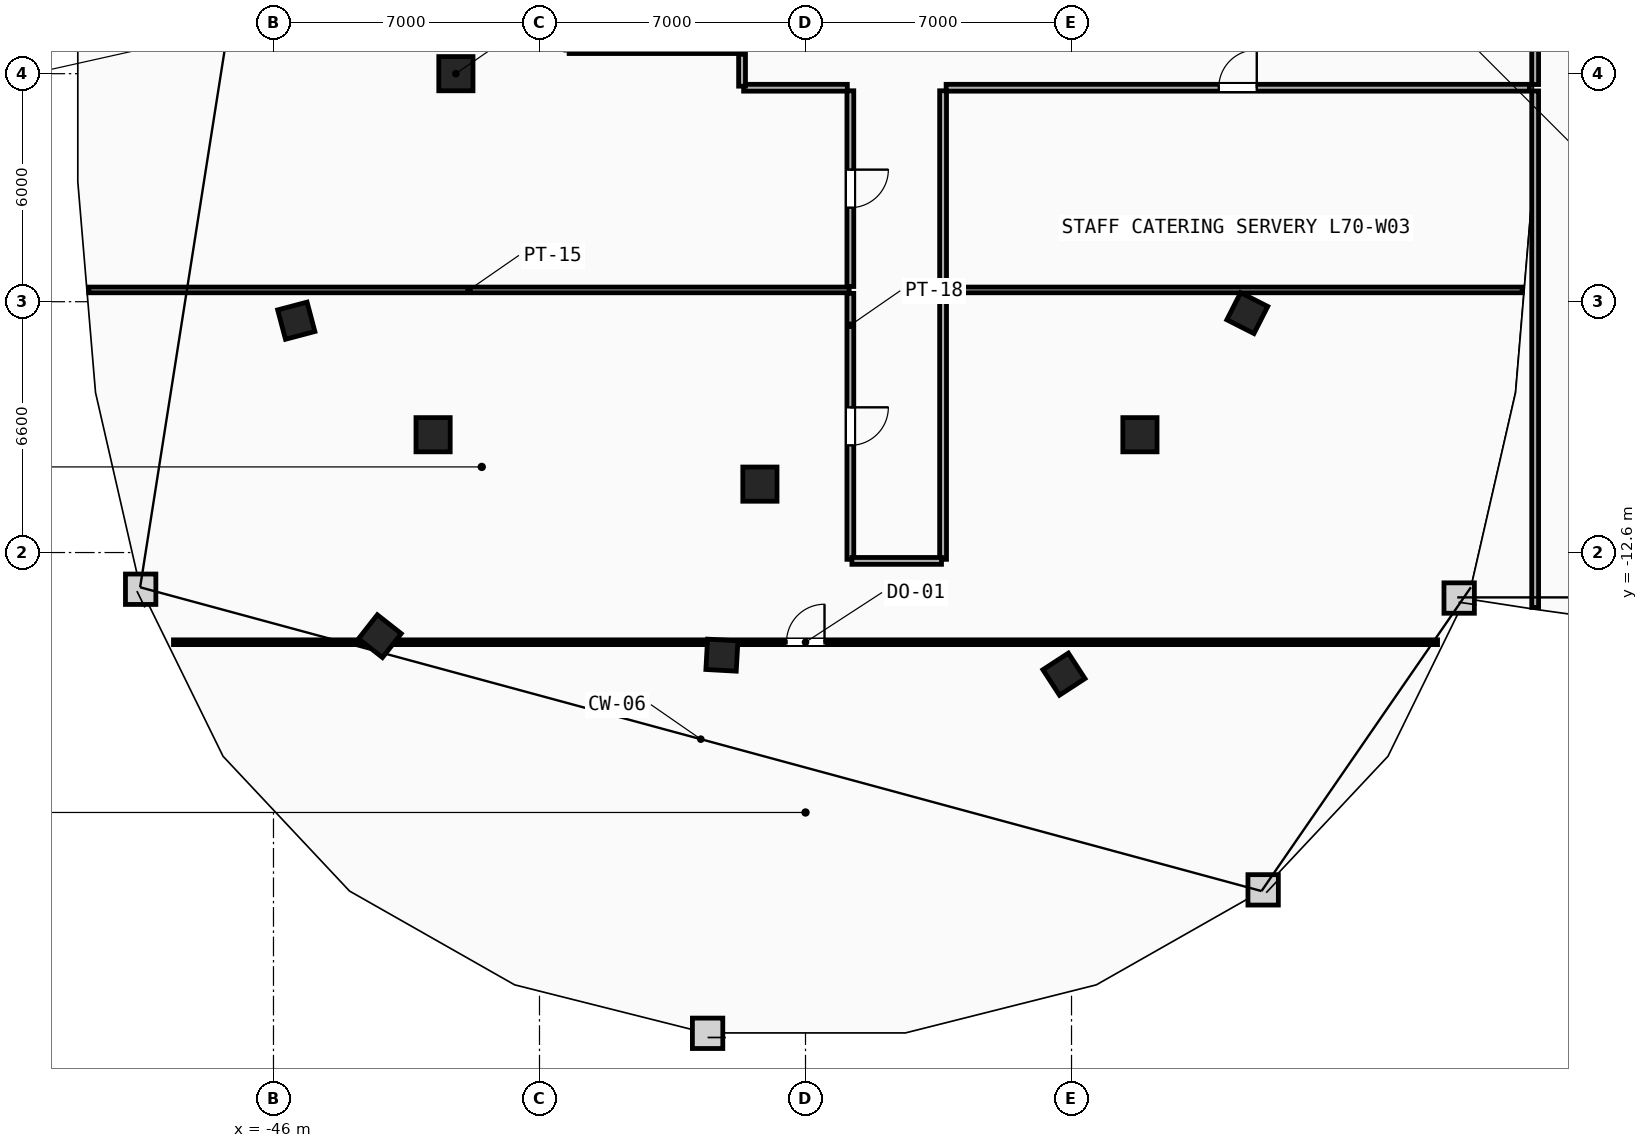
"""IFC4 building model, lengths in metres.
Left out: names, types, materials, properties, quantities, classifications, styles, units other than length and angle.
Written with IfcOpenShell. Run it as: python <this file> out.ifc"""

import sys

from ifc_helpers import new_model, si_unit, direction, frame, frame_2d, origin, origin_2d, place, context, subcontext, project, spatial, rectangle, extrude, element, fill, save


model = new_model("IFC4")
c1 = context("Model", 3, precision=1e-05, world=origin(), true_north=direction((0.0, 1.0)))
c2 = subcontext(c1, "Body", "Model", "MODEL_VIEW")
j1 = project(units=[si_unit("LENGTHUNIT", "METRE"), si_unit("PLANEANGLEUNIT", "RADIAN")], contexts=[c1])
p1 = place(None, origin())
s1 = spatial("IfcSite", under=j1, at=p1, CompositionType="ELEMENT")
p2 = place(p1, origin())
s2 = spatial("IfcBuilding", under=s1, at=p2, CompositionType="ELEMENT")
p3 = place(p2, frame((0.0, 0.0, 264.8)))
s3 = spatial("IfcBuildingStorey", under=s2, at=p3, CompositionType="ELEMENT", Elevation=264.8)
for number, where, z_axis, x_axis in (
    (1, (-41.2, 0.0, 0.0), (0.0, 0.0, 1.0), (1.0, 0.0, 0.0)),
    (2, (-41.8, -9.5, 0.0), (0.0, 0.0, 1.0), (1.0, 0.0, 0.0)),
    (3, (-33.2, -10.8, 0.0), (0.0, 0.0, 1.0), (1.0, 0.0, 0.0)),
    (4, (-23.2, -9.5, 0.0), (0.0, 0.0, 1.0), (1.0, 0.0, 0.0)),
):
    element("IfcColumn", number, at=place(p3, frame(where, z_axis=z_axis, x_axis=x_axis)), inside=s3, PredefinedType="COLUMN", context=c2, shape_type="SweptSolid", body=[
        extrude(rectangle(XDim=0.9, YDim=0.9, at=origin_2d()), origin(), (0.0, 0.0, 1.0), 3.6),
    ])
for number, where, z_axis, x_axis in (
    (5, (-45.4, -6.5, 0.0), (0.0, 0.0, 1.0), (0.256, -0.967, 0.0)),
    (6, (-43.2, -14.8, 0.0), (0.0, 0.0, 1.0), (0.786, -0.618, 0.0)),
    (7, (-34.2, -15.3, 0.0), (0.0, 0.0, 1.0), (0.998, -0.055, 0.0)),
    (8, (-25.2, -15.8, 0.0), (0.0, 0.0, 1.0), (0.838, 0.546, 0.0)),
    (9, (-20.375, -6.3, 0.0), (0.0, 0.0, 1.0), (0.453, 0.892, 0.0)),
):
    element("IfcColumn", number, at=place(p3, frame(where, z_axis=z_axis, x_axis=x_axis)), inside=s3, PredefinedType="COLUMN", context=c2, shape_type="SweptSolid", body=[
        extrude(rectangle(XDim=0.8, YDim=0.8, at=origin_2d()), origin(), (0.0, 0.0, 1.0), 3.6),
    ])
p4 = place(p3, frame((-38.22, 0.6, 0.0), z_axis=(0.0, 0.0, 1.0), x_axis=(1.0, 0.0, 0.0)))
e10 = element("IfcWall", 10, at=p4, inside=s3, PredefinedType="PARTITIONING", context=c2, shape_type="SweptSolid", body=[
    extrude(rectangle(XDim=4.48, YDim=0.14, at=frame_2d((2.24, 0.0))), origin(), (0.0, 0.0, 1.0), 3.34),
])
p5 = place(p3, frame((-50.86, -5.69, 0.0), z_axis=(0.0, 0.0, 1.0), x_axis=(1.0, 0.0, 0.0)))
e11 = element("IfcWall", 11, at=p5, inside=s3, PredefinedType="PARTITIONING", context=c2, shape_type="SweptSolid", body=[
    extrude(rectangle(XDim=20.01, YDim=0.15, at=frame_2d((10.005, 0.0))), origin(), (0.0, 0.0, 1.0), 3.34),
])
p6 = place(p3, frame((-28.35, -5.69, 0.0), z_axis=(0.0, 0.0, 1.0), x_axis=(1.0, 0.0, 0.0)))
e12 = element("IfcWall", 12, at=p6, inside=s3, PredefinedType="PARTITIONING", context=c2, shape_type="SweptSolid", body=[
    extrude(rectangle(XDim=15.21, YDim=0.15, at=frame_2d((7.605, 0.0))), origin(), (0.0, 0.0, 1.0), 3.34),
])
p7 = place(p3, frame((-30.82, -5.78, 0.0), z_axis=(0.0, 0.0, 1.0), x_axis=(0.0, -1.0, 0.0)))
e13 = element("IfcWall", 13, at=p7, inside=s3, PredefinedType="PARTITIONING", context=c2, shape_type="SweptSolid", body=[
    extrude(rectangle(XDim=6.999, YDim=0.18, at=frame_2d((3.499, 0.0))), origin(), (0.0, 0.0, 1.0), 3.34),
])
p8 = place(p7, frame((2.999, 0.0, 0.0)))
e14 = element("IfcOpeningElement", 14, at=p8, cuts=e13, PredefinedType="OPENING", context=c2, shape_type="SweptSolid", body=[
    extrude(rectangle(XDim=1.0, YDim=2.15, at=frame_2d((0.5, 1.075))), frame((0.0, 0.1, 0.0), z_axis=(0.0, -1.0, 0.0), x_axis=(1.0, 0.0, 0.0)), (0.0, 0.0, 1.0), 0.2),
])
p9 = place(p3, frame((-28.38, -12.779, 0.0), z_axis=(0.0, 0.0, 1.0), x_axis=(0.0, 1.0, 0.0)))
e15 = element("IfcWall", 15, at=p9, inside=s3, PredefinedType="PARTITIONING", context=c2, shape_type="SweptSolid", body=[
    extrude(rectangle(XDim=6.999, YDim=0.18, at=frame_2d((3.499, 0.0))), origin(), (0.0, 0.0, 1.0), 3.34),
])
p10 = place(p3, frame((-30.779, -12.82, 0.0), z_axis=(0.0, 0.0, 1.0), x_axis=(1.0, 0.0, 0.0)))
e16 = element("IfcWall", 16, at=p10, inside=s3, PredefinedType="PARTITIONING", context=c2, shape_type="SweptSolid", body=[
    extrude(rectangle(XDim=2.357, YDim=0.18, at=frame_2d((1.179, 0.0))), origin(), (0.0, 0.0, 1.0), 3.34),
])
p11 = place(p3, frame((-28.3, -0.37, 0.0), z_axis=(0.0, 0.0, 1.0), x_axis=(1.0, 0.0, 0.0)))
e17 = element("IfcWall", 17, at=p11, inside=s3, PredefinedType="PARTITIONING", context=c2, shape_type="SweptSolid", body=[
    extrude(rectangle(XDim=15.349, YDim=0.18, at=frame_2d((7.675, 0.0))), origin(), (0.0, 0.0, 1.0), 3.34),
])
p12 = place(p11, frame((7.175, 0.0, 0.0)))
e18 = element("IfcOpeningElement", 18, at=p12, cuts=e17, PredefinedType="OPENING", context=c2, shape_type="SweptSolid", body=[
    extrude(rectangle(XDim=1.0, YDim=2.15, at=frame_2d((0.5, 1.075))), frame((0.0, 0.1, 0.0), z_axis=(0.0, -1.0, 0.0), x_axis=(1.0, 0.0, 0.0)), (0.0, 0.0, 1.0), 0.2),
])
p13 = place(p3, frame((-28.38, -5.6, 0.0), z_axis=(0.0, 0.0, 1.0), x_axis=(0.0, 1.0, 0.0)))
e19 = element("IfcWall", 19, at=p13, inside=s3, PredefinedType="PARTITIONING", context=c2, shape_type="SweptSolid", body=[
    extrude(rectangle(XDim=5.15, YDim=0.18, at=frame_2d((2.575, 0.0))), origin(), (0.0, 0.0, 1.0), 3.34),
])
p14 = place(p3, frame((-30.82, -0.45, 0.0), z_axis=(0.0, 0.0, 1.0), x_axis=(0.0, -1.0, 0.0)))
e20 = element("IfcWall", 20, at=p14, inside=s3, PredefinedType="PARTITIONING", context=c2, shape_type="SweptSolid", body=[
    extrude(rectangle(XDim=5.15, YDim=0.18, at=frame_2d((2.575, 0.0))), origin(), (0.0, 0.0, 1.0), 3.34),
])
p15 = place(p14, frame((2.075, 0.0, 0.0)))
e21 = element("IfcOpeningElement", 21, at=p15, cuts=e20, PredefinedType="OPENING", context=c2, shape_type="SweptSolid", body=[
    extrude(rectangle(XDim=1.0, YDim=2.15, at=frame_2d((0.5, 1.075))), frame((0.0, 0.1, 0.0), z_axis=(0.0, -1.0, 0.0), x_axis=(1.0, 0.0, 0.0)), (0.0, 0.0, 1.0), 0.2),
])
p16 = place(p3, frame((-33.628, -0.37, 0.0), z_axis=(0.0, 0.0, 1.0), x_axis=(1.0, 0.0, 0.0)))
e22 = element("IfcWall", 22, at=p16, inside=s3, PredefinedType="PARTITIONING", context=c2, shape_type="SweptSolid", body=[
    extrude(rectangle(XDim=2.729, YDim=0.18, at=frame_2d((1.364, 0.0))), origin(), (0.0, 0.0, 1.0), 3.34),
])
p17 = place(p3, frame((-33.67, 0.509, 0.0), z_axis=(0.0, 0.0, 1.0), x_axis=(0.0, -1.0, 0.0)))
e23 = element("IfcWall", 23, at=p17, inside=s3, PredefinedType="PARTITIONING", context=c2, shape_type="SweptSolid", body=[
    extrude(rectangle(XDim=0.837, YDim=0.18, at=frame_2d((0.418, 0.0))), origin(), (0.0, 0.0, 1.0), 3.34),
])
p18 = place(p3, frame((-48.632, -14.96, 0.0), z_axis=(0.0, 0.0, 1.0), x_axis=(1.0, 0.0, 0.0)))
e24 = element("IfcWall", 24, at=p18, inside=s3, PredefinedType="PARTITIONING", context=c2, shape_type="SweptSolid", body=[
    extrude(rectangle(XDim=33.263, YDim=0.125, at=frame_2d((16.632, 0.0))), origin(), (0.0, 0.0, 1.0), 2.724),
])
p19 = place(p18, frame((16.132, 0.0, 0.0)))
e25 = element("IfcOpeningElement", 25, at=p19, cuts=e24, PredefinedType="OPENING", context=c2, shape_type="SweptSolid", body=[
    extrude(rectangle(XDim=1.0, YDim=2.15, at=frame_2d((0.5, 1.075))), frame((0.0, 0.073, 0.0), z_axis=(0.0, -1.0, 0.0), x_axis=(1.0, 0.0, 0.0)), (0.0, 0.0, 1.0), 0.145),
])
p20 = place(p3, frame((-12.8, -14.044, 0.0), z_axis=(0.0, 0.0, 1.0), x_axis=(0.0, 1.0, 0.0)))
e26 = element("IfcWall", 26, at=p20, inside=s3, PredefinedType="PARTITIONING", context=c2, shape_type="SweptSolid", body=[
    extrude(rectangle(XDim=13.589, YDim=0.18, at=frame_2d((6.794, 0.0))), origin(), (0.0, 0.0, 1.0), 3.34),
])
p21 = place(p3, frame((-12.8, -0.285, 0.0), z_axis=(0.0, 0.0, 1.0), x_axis=(0.0, 1.0, 0.0)))
e27 = element("IfcWall", 27, at=p21, inside=s3, PredefinedType="PARTITIONING", context=c2, shape_type="SweptSolid", body=[
    extrude(rectangle(XDim=1.445, YDim=0.18, at=frame_2d((0.722, 0.0))), origin(), (0.0, 0.0, 1.0), 3.34),
])
p22 = place(p19, origin())
e28 = element("IfcDoor", 28, at=p22, inside=s3, OperationType="SINGLE_SWING_RIGHT", PredefinedType="DOOR", context=c2, shape_type="SweptSolid", body=[
    extrude(rectangle(XDim=1.0, YDim=2.15, at=frame_2d((0.5, 1.075))), frame((0.0, 0.025, 0.0), z_axis=(0.0, -1.0, 0.0), x_axis=(1.0, 0.0, 0.0)), (0.0, 0.0, 1.0), 0.05),
])
fill(e25, e28)
p23 = place(p12, origin())
e29 = element("IfcDoor", 29, at=p23, inside=s3, OperationType="SINGLE_SWING_RIGHT", PredefinedType="DOOR", context=c2, shape_type="SweptSolid", body=[
    extrude(rectangle(XDim=1.0, YDim=2.15, at=frame_2d((0.5, 1.075))), frame((0.0, 0.025, 0.0), z_axis=(0.0, -1.0, 0.0), x_axis=(1.0, 0.0, 0.0)), (0.0, 0.0, 1.0), 0.05),
])
fill(e18, e29)
p24 = place(p8, origin())
e30 = element("IfcDoor", 30, at=p24, inside=s3, OperationType="SINGLE_SWING_LEFT", PredefinedType="DOOR", context=c2, shape_type="SweptSolid", body=[
    extrude(rectangle(XDim=1.0, YDim=2.15, at=frame_2d((0.5, 1.075))), frame((0.0, 0.025, 0.0), z_axis=(0.0, -1.0, 0.0), x_axis=(1.0, 0.0, 0.0)), (0.0, 0.0, 1.0), 0.05),
])
fill(e14, e30)
p25 = place(p15, origin())
e31 = element("IfcDoor", 31, at=p25, inside=s3, OperationType="SINGLE_SWING_LEFT", PredefinedType="DOOR", context=c2, shape_type="SweptSolid", body=[
    extrude(rectangle(XDim=1.0, YDim=2.15, at=frame_2d((0.5, 1.075))), frame((0.0, 0.025, 0.0), z_axis=(0.0, -1.0, 0.0), x_axis=(1.0, 0.0, 0.0)), (0.0, 0.0, 1.0), 0.05),
])
fill(e21, e31)
save(model, sys.argv[1])
